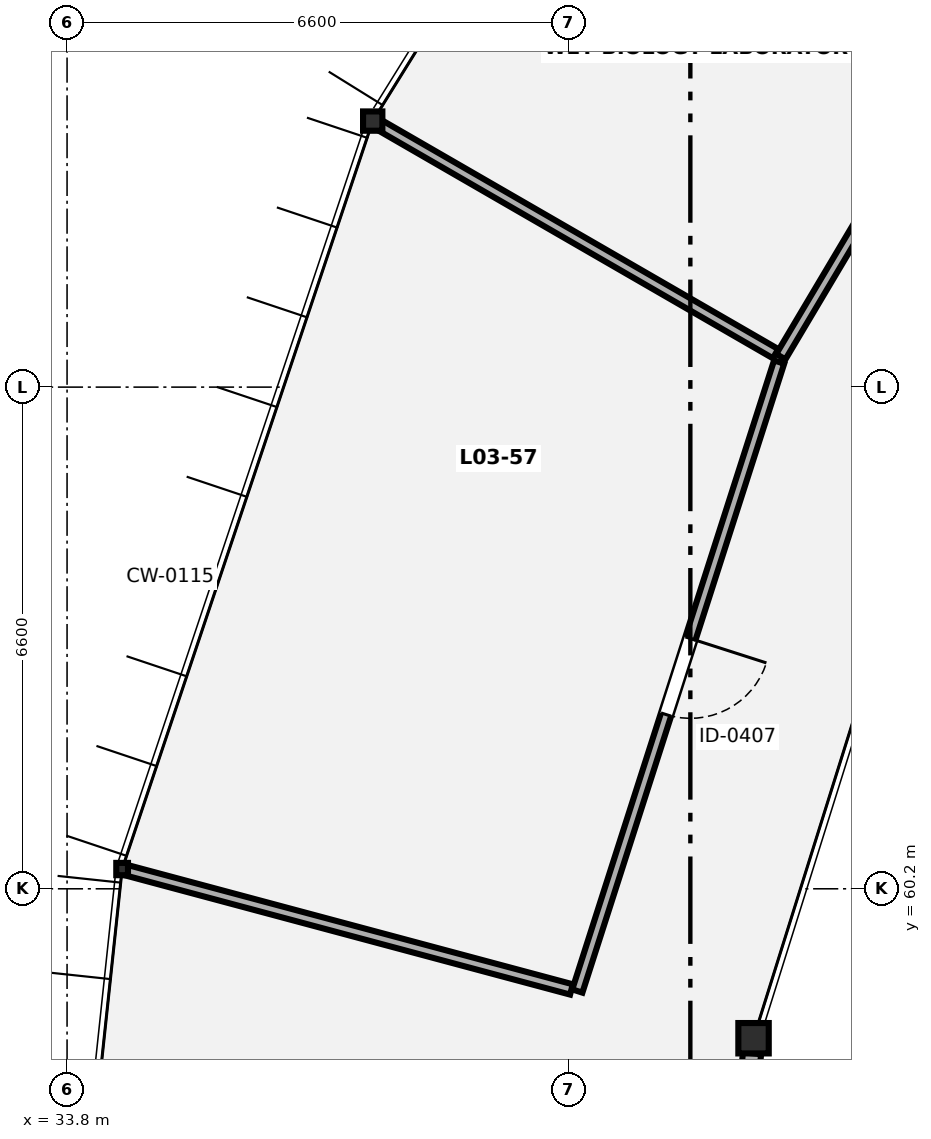
"""IFC4 building model, lengths in metres.
Left out: names, types, materials, properties, quantities, classifications, styles, units other than length and angle.
Written with IfcOpenShell. Run it as: python <this file> out.ifc"""

import sys

from ifc_helpers import new_model, si_unit, direction, frame, frame_2d, origin, origin_2d, place, context, subcontext, project, spatial, rectangle, i_section, extrude, element, fill, save


model = new_model("IFC4")
c1 = context("Model", 3, precision=1e-05, world=origin(), true_north=direction((0.0, 1.0)))
c2 = subcontext(c1, "Body", "Model", "MODEL_VIEW")
j1 = project(units=[si_unit("LENGTHUNIT", "METRE"), si_unit("PLANEANGLEUNIT", "RADIAN")], contexts=[c1])
p1 = place(None, origin())
s1 = spatial("IfcSite", under=j1, at=p1, CompositionType="ELEMENT")
p2 = place(p1, origin())
s2 = spatial("IfcBuilding", under=s1, at=p2, CompositionType="ELEMENT")
p3 = place(p2, frame((0.0, 0.0, 13.3)))
s3 = spatial("IfcBuildingStorey", under=s2, at=p3, CompositionType="ELEMENT", Elevation=13.3)
p4 = place(p3, frame((37.821, 70.3, 0.0), z_axis=(0.0, 0.0, 1.0), x_axis=(1.0, 0.0, 0.0)))
e1 = element("IfcColumn", 1, at=p4, inside=s3, PredefinedType="COLUMN", context=c2, shape_type="SweptSolid", body=[
    extrude(i_section(OverallWidth=0.254, OverallDepth=0.254, WebThickness=0.009, FlangeThickness=0.014, FilletRadius=0.014, at=origin_2d()), origin(), (0.0, 0.0, 1.0), 4.2),
])
p5 = place(p3, frame((34.524, 60.46, 0.0), z_axis=(0.0, 0.0, 1.0), x_axis=(1.0, 0.0, 0.0)))
e2 = element("IfcColumn", 2, at=p5, inside=s3, PredefinedType="COLUMN", context=c2, shape_type="SweptSolid", body=[
    extrude(i_section(OverallWidth=0.154, OverallDepth=0.162, WebThickness=0.008, FlangeThickness=0.011, FilletRadius=0.009, at=origin_2d()), origin(), (0.0, 0.0, 1.0), 4.2),
])
p6 = place(p3, frame((42.831, 58.234, 0.0), z_axis=(0.0, 0.0, 1.0), x_axis=(1.0, 0.0, 0.0)))
e3 = element("IfcColumn", 3, at=p6, inside=s3, PredefinedType="PILASTER", context=c2, shape_type="SweptSolid", body=[
    extrude(rectangle(XDim=0.4, YDim=0.4, at=origin_2d()), origin(), (0.0, 0.0, 1.0), 4.2),
])
p7 = place(p3, frame((42.812, 58.036, 0.0), z_axis=(0.0, 0.0, 1.0), x_axis=(-0.099255190182, -0.995062011747, 0.0)))
e4 = element("IfcWall", 4, at=p7, inside=s3, PredefinedType="SOLIDWALL", context=c2, shape_type="SweptSolid", body=[
    extrude(rectangle(XDim=8.073, YDim=0.24, at=frame_2d((4.036, 0.0))), origin(), (0.0, 0.0, 1.0), 3.65),
])
p8 = place(p7, frame((3.311, 0.0, 0.85)))
e5 = element("IfcOpeningElement", 5, at=p8, cuts=e4, PredefinedType="OPENING", context=c2, shape_type="SweptSolid", body=[
    extrude(rectangle(XDim=1.45, YDim=1.25, at=frame_2d((0.725, 0.625))), frame((0.0, 0.13, 0.0), z_axis=(0.0, -1.0, 0.0), x_axis=(1.0, 0.0, 0.0)), (0.0, 0.0, 1.0), 0.26),
])
p9 = place(p3, frame((47.448, 74.364, 0.0), z_axis=(0.0, 0.0, 1.0), x_axis=(-0.510915698067, -0.859630821614, 0.0)))
e6 = element("IfcWall", 6, at=p9, inside=s3, PredefinedType="PARTITIONING", context=c2, shape_type="SweptSolid", body=[
    extrude(rectangle(XDim=8.334, YDim=0.14, at=frame_2d((4.167, 0.0))), origin(), (0.0, 0.0, 1.0), 3.98),
])
p10 = place(p3, frame((43.121, 67.24, 0.0), z_axis=(0.0, 0.0, 1.0), x_axis=(-0.866010470582, 0.500025864173, 0.0)))
e7 = element("IfcWall", 7, at=p10, inside=s3, PredefinedType="PARTITIONING", context=c2, shape_type="SweptSolid", body=[
    extrude(rectangle(XDim=6.06, YDim=0.14, at=frame_2d((3.03, 0.0))), origin(), (0.0, 0.0, 1.0), 3.471),
])
p11 = place(p3, frame((43.168, 67.13, 0.0), z_axis=(0.0, 0.0, 1.0), x_axis=(-0.305487150125, -0.952196198852, 0.0)))
e8 = element("IfcWall", 8, at=p11, inside=s3, PredefinedType="PARTITIONING", context=c2, shape_type="SweptSolid", body=[
    extrude(rectangle(XDim=8.69, YDim=0.14, at=frame_2d((4.345, 0.0))), origin(), (0.0, 0.0, 1.0), 3.98),
])
p12 = place(p11, frame((3.82, 0.0, 0.0)))
e9 = element("IfcOpeningElement", 9, at=p12, cuts=e8, PredefinedType="OPENING", context=c2, shape_type="SweptSolid", body=[
    extrude(rectangle(XDim=1.05, YDim=2.15, at=frame_2d((0.525, 1.075))), frame((0.0, 0.08, 0.0), z_axis=(0.0, -1.0, 0.0), x_axis=(1.0, 0.0, 0.0)), (0.0, 0.0, 1.0), 0.16),
])
p13 = place(p3, frame((40.436, 58.876, 0.0), z_axis=(0.0, 0.0, 1.0), x_axis=(-0.965916578341, 0.258853556448, 0.0)))
e10 = element("IfcWall", 10, at=p13, inside=s3, PredefinedType="PARTITIONING", context=c2, shape_type="SweptSolid", body=[
    extrude(rectangle(XDim=6.06, YDim=0.14, at=frame_2d((3.03, 0.0))), origin(), (0.0, 0.0, 1.0), 3.465),
])
p14 = place(p12, origin())
e11 = element("IfcDoor", 11, at=p14, inside=s3, OperationType="SINGLE_SWING_LEFT", PredefinedType="DOOR", context=c2, shape_type="SweptSolid", body=[
    extrude(rectangle(XDim=1.05, YDim=2.15, at=frame_2d((0.525, 1.075))), frame((0.0, 0.025, 0.0), z_axis=(0.0, -1.0, 0.0), x_axis=(1.0, 0.0, 0.0)), (0.0, 0.0, 1.0), 0.05),
])
fill(e9, e11)
save(model, sys.argv[1])
